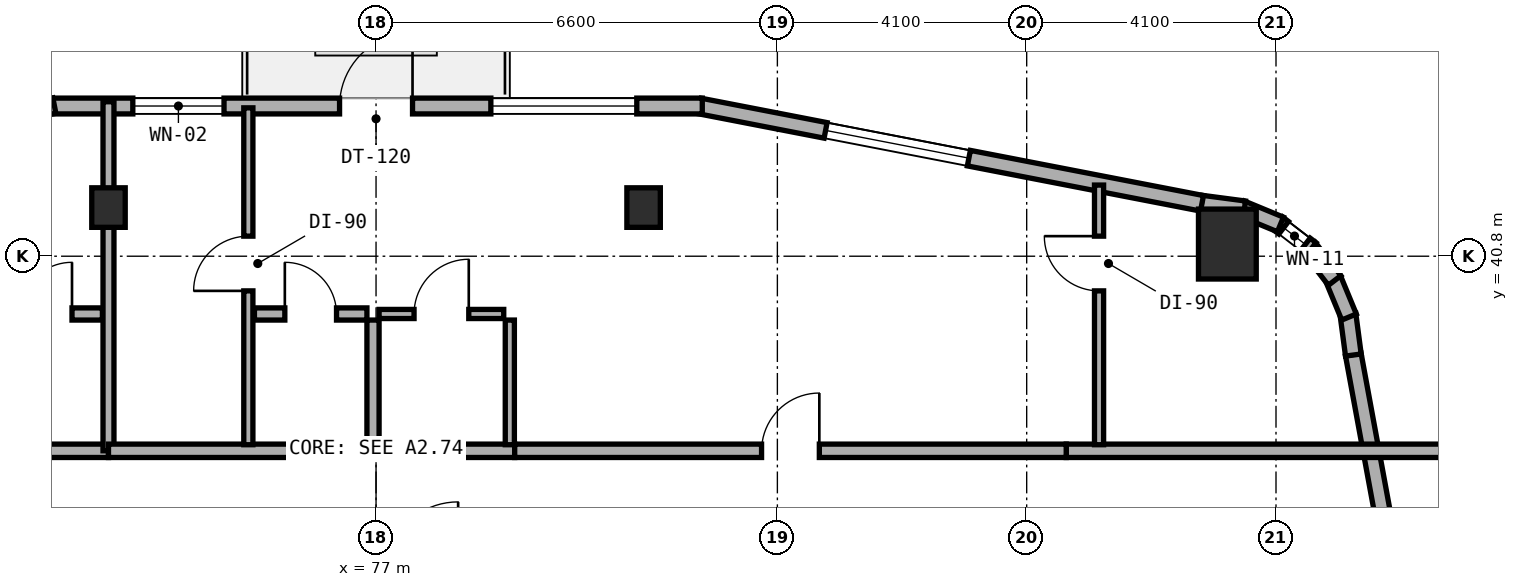
"""IFC4 building model, lengths in metres.
Left out: names, types, materials, properties, quantities, classifications, styles, units other than length and angle.
Written with IfcOpenShell. Run it as: python <this file> out.ifc"""

import sys

from ifc_helpers import new_model, si_unit, direction, frame, frame_2d, origin, origin_2d, place, context, subcontext, project, spatial, rectangle, extrude, element, fill, save


model = new_model("IFC4")
c1 = context("Model", 3, precision=1e-05, world=origin(), true_north=direction((0.0, 1.0)))
c2 = subcontext(c1, "Body", "Model", "MODEL_VIEW")
j1 = project(units=[si_unit("LENGTHUNIT", "METRE"), si_unit("PLANEANGLEUNIT", "RADIAN")], contexts=[c1])
p1 = place(None, origin())
s1 = spatial("IfcSite", under=j1, at=p1, CompositionType="ELEMENT")
p2 = place(p1, origin())
s2 = spatial("IfcBuilding", under=s1, at=p2, CompositionType="ELEMENT")
p3 = place(p2, frame((0.0, 0.0, 112.5)))
s3 = spatial("IfcBuildingStorey", under=s2, at=p3, CompositionType="ELEMENT", Elevation=112.5)
for number, where, z_axis, x_axis in (
    (1, (72.6, 41.6, 0.0), (0.0, 0.0, 1.0), (1.0, 0.0, 0.0)),
    (2, (81.4, 41.6, 0.0), (0.0, 0.0, 1.0), (1.0, 0.0, 0.0)),
):
    element("IfcColumn", number, at=place(p3, frame(where, z_axis=z_axis, x_axis=x_axis)), inside=s3, PredefinedType="COLUMN", context=c2, shape_type="SweptSolid", body=[
        extrude(rectangle(XDim=0.55, YDim=0.65, at=origin_2d()), origin(), (0.0, 0.0, 1.0), 3.5),
    ])
p4 = place(p3, frame((91.0, 41.0, 0.0), z_axis=(0.0, 0.0, 1.0), x_axis=(1.0, 0.0, 0.0)))
e3 = element("IfcColumn", 3, at=p4, inside=s3, PredefinedType="COLUMN", context=c2, shape_type="SweptSolid", body=[
    extrude(rectangle(XDim=0.95, YDim=1.15, at=origin_2d()), origin(), (0.0, 0.0, 1.0), 3.5),
])
p5 = place(p3, frame((94.682, 30.442, 0.0), z_axis=(0.0, 0.0, 1.0), x_axis=(-0.181209963057, 0.983444431215, 0.0)))
e4 = element("IfcWall", 4, at=p5, inside=s3, PredefinedType="STANDARD", context=c2, shape_type="SweptSolid", body=[
    extrude(rectangle(XDim=8.889, YDim=0.26, at=frame_2d((4.445, 0.0))), origin(), (0.0, 0.0, 1.0), 3.25),
])
p6 = place(p5, frame((1.444, 0.0, 0.8)))
e5 = element("IfcOpeningElement", 5, at=p6, cuts=e4, PredefinedType="OPENING", context=c2, shape_type="SweptSolid", body=[
    extrude(rectangle(XDim=2.4, YDim=1.6, at=frame_2d((1.2, 0.8))), frame((0.0, 0.14, 0.0), z_axis=(0.0, -1.0, 0.0), x_axis=(1.0, 0.0, 0.0)), (0.0, 0.0, 1.0), 0.28),
])
p7 = place(p3, frame((93.072, 39.175, 0.0), z_axis=(0.0, 0.0, 1.0), x_axis=(-0.131667498923, 0.991293937098, 0.0)))
e6 = element("IfcWall", 6, at=p7, inside=s3, PredefinedType="STANDARD", context=c2, shape_type="SweptSolid", body=[
    extrude(rectangle(XDim=0.677, YDim=0.26, at=frame_2d((0.338, 0.0))), origin(), (0.0, 0.0, 1.0), 3.25),
])
p8 = place(p3, frame((93.001, 39.8, 0.0), z_axis=(0.0, 0.0, 1.0), x_axis=(-0.381988976935, 0.924166879681, 0.0)))
e7 = element("IfcWall", 7, at=p8, inside=s3, PredefinedType="STANDARD", context=c2, shape_type="SweptSolid", body=[
    extrude(rectangle(XDim=0.693, YDim=0.26, at=frame_2d((0.347, 0.0))), origin(), (0.0, 0.0, 1.0), 3.25),
])
p9 = place(p3, frame((92.764, 40.401, 0.0), z_axis=(0.0, 0.0, 1.0), x_axis=(-0.609472651958, 0.792807092876, 0.0)))
e8 = element("IfcWall", 8, at=p9, inside=s3, PredefinedType="STANDARD", context=c2, shape_type="SweptSolid", body=[
    extrude(rectangle(XDim=0.694, YDim=0.26, at=frame_2d((0.347, 0.0))), origin(), (0.0, 0.0, 1.0), 3.25),
])
p10 = place(p3, frame((92.379, 40.92, 0.0), z_axis=(0.0, 0.0, 1.0), x_axis=(-0.792506234191, 0.609863811657, 0.0)))
e9 = element("IfcWall", 9, at=p10, inside=s3, PredefinedType="STANDARD", context=c2, shape_type="SweptSolid", body=[
    extrude(rectangle(XDim=0.694, YDim=0.26, at=frame_2d((0.347, 0.0))), origin(), (0.0, 0.0, 1.0), 3.25),
])
p11 = place(p10, frame((0.122, 0.0, 0.85)))
e10 = element("IfcOpeningElement", 10, at=p11, cuts=e9, PredefinedType="OPENING", context=c2, shape_type="SweptSolid", body=[
    extrude(rectangle(XDim=0.45, YDim=1.5, at=frame_2d((0.225, 0.75))), frame((0.0, 0.14, 0.0), z_axis=(0.0, -1.0, 0.0), x_axis=(1.0, 0.0, 0.0)), (0.0, 0.0, 1.0), 0.28),
])
p12 = place(p3, frame((91.873, 41.322, 0.0), z_axis=(0.0, 0.0, 1.0), x_axis=(-0.92421822618, 0.381864727877, 0.0)))
e11 = element("IfcWall", 11, at=p12, inside=s3, PredefinedType="STANDARD", context=c2, shape_type="SweptSolid", body=[
    extrude(rectangle(XDim=0.694, YDim=0.26, at=frame_2d((0.347, 0.0))), origin(), (0.0, 0.0, 1.0), 3.25),
])
p13 = place(p3, frame((91.281, 41.579, 0.0), z_axis=(0.0, 0.0, 1.0), x_axis=(-0.991433279471, 0.130614135366, 0.0)))
e12 = element("IfcWall", 12, at=p13, inside=s3, PredefinedType="STANDARD", context=c2, shape_type="SweptSolid", body=[
    extrude(rectangle(XDim=0.712, YDim=0.26, at=frame_2d((0.356, 0.0))), origin(), (0.0, 0.0, 1.0), 3.25),
])
p14 = place(p3, frame((90.583, 41.67, 0.0), z_axis=(0.0, 0.0, 1.0), x_axis=(-0.98174070399, 0.190224052445, 0.0)))
e13 = element("IfcWall", 13, at=p14, inside=s3, PredefinedType="STANDARD", context=c2, shape_type="SweptSolid", body=[
    extrude(rectangle(XDim=8.412, YDim=0.26, at=frame_2d((4.206, 0.0))), origin(), (0.0, 0.0, 1.0), 3.25),
])
p15 = place(p14, frame((3.905, 0.0, 0.8)))
e14 = element("IfcOpeningElement", 14, at=p15, cuts=e13, PredefinedType="OPENING", context=c2, shape_type="SweptSolid", body=[
    extrude(rectangle(XDim=2.4, YDim=1.6, at=frame_2d((1.2, 0.8))), frame((0.0, 0.14, 0.0), z_axis=(0.0, -1.0, 0.0), x_axis=(1.0, 0.0, 0.0)), (0.0, 0.0, 1.0), 0.28),
])
p16 = place(p3, frame((82.365, 43.27, 0.0), z_axis=(0.0, 0.0, 1.0), x_axis=(-1.0, 0.0, 0.0)))
e15 = element("IfcWall", 15, at=p16, inside=s3, PredefinedType="STANDARD", context=c2, shape_type="SweptSolid", body=[
    extrude(rectangle(XDim=10.695, YDim=0.26, at=frame_2d((5.348, 0.0))), origin(), (0.0, 0.0, 1.0), 3.25),
])
p17 = place(p16, frame((4.765, 0.0, 0.0)))
e16 = element("IfcOpeningElement", 16, at=p17, cuts=e15, PredefinedType="OPENING", context=c2, shape_type="SweptSolid", body=[
    extrude(rectangle(XDim=1.2, YDim=2.15, at=frame_2d((0.6, 1.075))), frame((0.0, 0.14, 0.0), z_axis=(0.0, -1.0, 0.0), x_axis=(1.0, 0.0, 0.0)), (0.0, 0.0, 1.0), 0.28),
])
p18 = place(p16, frame((1.077, 0.0, 0.8)))
e17 = element("IfcOpeningElement", 17, at=p18, cuts=e15, PredefinedType="OPENING", context=c2, shape_type="SweptSolid", body=[
    extrude(rectangle(XDim=2.4, YDim=1.6, at=frame_2d((1.2, 0.8))), frame((0.0, 0.14, 0.0), z_axis=(0.0, -1.0, 0.0), x_axis=(1.0, 0.0, 0.0)), (0.0, 0.0, 1.0), 0.28),
])
p19 = place(p16, frame((7.865, 0.0, 0.85)))
e18 = element("IfcOpeningElement", 18, at=p19, cuts=e15, PredefinedType="OPENING", context=c2, shape_type="SweptSolid", body=[
    extrude(rectangle(XDim=1.5, YDim=1.5, at=frame_2d((0.75, 0.75))), frame((0.0, 0.14, 0.0), z_axis=(0.0, -1.0, 0.0), x_axis=(1.0, 0.0, 0.0)), (0.0, 0.0, 1.0), 0.28),
])
p20 = place(p3, frame((71.71, 43.277, 0.0), z_axis=(0.0, 0.0, 1.0), x_axis=(-0.981733729692, -0.190260043057, 0.0)))
e19 = element("IfcWall", 19, at=p20, inside=s3, PredefinedType="STANDARD", context=c2, shape_type="SweptSolid", body=[
    extrude(rectangle(XDim=8.447, YDim=0.26, at=frame_2d((4.224, 0.0))), origin(), (0.0, 0.0, 1.0), 3.25),
])
p21 = place(p20, frame((2.608, 0.0, 0.8)))
e20 = element("IfcOpeningElement", 20, at=p21, cuts=e19, PredefinedType="OPENING", context=c2, shape_type="SweptSolid", body=[
    extrude(rectangle(XDim=2.4, YDim=1.6, at=frame_2d((1.2, 0.8))), frame((0.0, 0.14, 0.0), z_axis=(0.0, -1.0, 0.0), x_axis=(1.0, 0.0, 0.0)), (0.0, 0.0, 1.0), 0.28),
])
p22 = place(p3, frame((68.22, 37.6, 0.0), z_axis=(0.0, 0.0, 1.0), x_axis=(1.0, 0.0, 0.0)))
e21 = element("IfcWall", 21, at=p22, inside=s3, PredefinedType="SOLIDWALL", context=c2, shape_type="SweptSolid", body=[
    extrude(rectangle(XDim=4.38, YDim=0.22, at=frame_2d((2.19, 0.0))), origin(), (0.0, 0.0, 1.0), 2.825),
])
p23 = place(p3, frame((70.65, 39.85, 0.0), z_axis=(0.0, 0.0, 1.0), x_axis=(1.0, 0.0, 0.0)))
e22 = element("IfcWall", 22, at=p23, inside=s3, PredefinedType="PLUMBINGWALL", context=c2, shape_type="SweptSolid", body=[
    extrude(rectangle(XDim=1.85, YDim=0.2, at=frame_2d((0.925, 0.0))), origin(), (0.0, 0.0, 1.0), 3.22),
])
p24 = place(p23, frame((0.5, 0.0, 0.0)))
e23 = element("IfcOpeningElement", 23, at=p24, cuts=e22, PredefinedType="OPENING", context=c2, shape_type="SweptSolid", body=[
    extrude(rectangle(XDim=0.85, YDim=2.1, at=frame_2d((0.425, 1.05))), frame((0.0, 0.11, 0.0), z_axis=(0.0, -1.0, 0.0), x_axis=(1.0, 0.0, 0.0)), (0.0, 0.0, 1.0), 0.22),
])
p25 = place(p3, frame((72.6, 37.6, 0.0), z_axis=(0.0, 0.0, 1.0), x_axis=(0.0, 1.0, 0.0)))
e24 = element("IfcWall", 24, at=p25, inside=s3, PredefinedType="SOLIDWALL", context=c2, shape_type="SweptSolid", body=[
    extrude(rectangle(XDim=5.74, YDim=0.18, at=frame_2d((2.87, 0.0))), origin(), (0.0, 0.0, 1.0), 2.825),
])
p26 = place(p3, frame((72.6, 37.6, 0.0), z_axis=(0.0, 0.0, 1.0), x_axis=(1.0, 0.0, 0.0)))
e25 = element("IfcWall", 25, at=p26, inside=s3, PredefinedType="SOLIDWALL", context=c2, shape_type="SweptSolid", body=[
    extrude(rectangle(XDim=6.68, YDim=0.22, at=frame_2d((3.34, 0.0))), origin(), (0.0, 0.0, 1.0), 2.825),
])
p27 = place(p3, frame((88.35, 37.6, 0.0), z_axis=(0.0, 0.0, 1.0), x_axis=(1.0, 0.0, 0.0)))
e26 = element("IfcWall", 26, at=p27, inside=s3, PredefinedType="SOLIDWALL", context=c2, shape_type="SweptSolid", body=[
    extrude(rectangle(XDim=6.29, YDim=0.22, at=frame_2d((3.145, 0.0))), origin(), (0.0, 0.0, 1.0), 2.945),
])
p28 = place(p3, frame((79.28, 37.6, 0.0), z_axis=(0.0, 0.0, 1.0), x_axis=(1.0, 0.0, 0.0)))
e27 = element("IfcWall", 27, at=p28, inside=s3, PredefinedType="SOLIDWALL", context=c2, shape_type="SweptSolid", body=[
    extrude(rectangle(XDim=9.07, YDim=0.22, at=frame_2d((4.535, 0.0))), origin(), (0.0, 0.0, 1.0), 2.825),
])
p29 = place(p28, frame((4.06, 0.0, 0.0)))
e28 = element("IfcOpeningElement", 28, at=p29, cuts=e27, PredefinedType="OPENING", context=c2, shape_type="SweptSolid", body=[
    extrude(rectangle(XDim=0.95, YDim=2.1, at=frame_2d((0.475, 1.05))), frame((0.0, 0.12, 0.0), z_axis=(0.0, -1.0, 0.0), x_axis=(1.0, 0.0, 0.0)), (0.0, 0.0, 1.0), 0.24),
])
p30 = place(p3, frame((74.9, 37.7, 0.0), z_axis=(0.0, 0.0, 1.0), x_axis=(0.0, 1.0, 0.0)))
e29 = element("IfcWall", 29, at=p30, inside=s3, PredefinedType="PARTITIONING", context=c2, shape_type="SweptSolid", body=[
    extrude(rectangle(XDim=5.54, YDim=0.15, at=frame_2d((2.77, 0.0))), origin(), (0.0, 0.0, 1.0), 2.895),
])
p31 = place(p30, frame((2.53, 0.0, 0.0)))
e30 = element("IfcOpeningElement", 30, at=p31, cuts=e29, PredefinedType="OPENING", context=c2, shape_type="SweptSolid", body=[
    extrude(rectangle(XDim=0.9, YDim=2.1, at=frame_2d((0.45, 1.05))), frame((0.0, 0.085, 0.0), z_axis=(0.0, -1.0, 0.0), x_axis=(1.0, 0.0, 0.0)), (0.0, 0.0, 1.0), 0.17),
])
p32 = place(p3, frame((88.89, 37.7, 0.0), z_axis=(0.0, 0.0, 1.0), x_axis=(0.0, 1.0, 0.0)))
e31 = element("IfcWall", 31, at=p32, inside=s3, PredefinedType="PARTITIONING", context=c2, shape_type="SweptSolid", body=[
    extrude(rectangle(XDim=4.27, YDim=0.15, at=frame_2d((2.135, 0.0))), origin(), (0.0, 0.0, 1.0), 2.945),
])
p33 = place(p32, frame((2.53, 0.0, 0.0)))
e32 = element("IfcOpeningElement", 32, at=p33, cuts=e31, PredefinedType="OPENING", context=c2, shape_type="SweptSolid", body=[
    extrude(rectangle(XDim=0.9, YDim=2.1, at=frame_2d((0.45, 1.05))), frame((0.0, 0.085, 0.0), z_axis=(0.0, -1.0, 0.0), x_axis=(1.0, 0.0, 0.0)), (0.0, 0.0, 1.0), 0.17),
])
p34 = place(p3, frame((76.95, 37.7, 0.0), z_axis=(0.0, 0.0, 1.0), x_axis=(0.0, 1.0, 0.0)))
e33 = element("IfcWall", 33, at=p34, inside=s3, PredefinedType="PLUMBINGWALL", context=c2, shape_type="SweptSolid", body=[
    extrude(rectangle(XDim=2.05, YDim=0.2, at=frame_2d((1.025, 0.0))), origin(), (0.0, 0.0, 1.0), 2.895),
])
p35 = place(p3, frame((79.2, 37.7, 0.0), z_axis=(0.0, 0.0, 1.0), x_axis=(0.0, 1.0, 0.0)))
e34 = element("IfcWall", 34, at=p35, inside=s3, PredefinedType="PARTITIONING", context=c2, shape_type="SweptSolid", body=[
    extrude(rectangle(XDim=2.05, YDim=0.15, at=frame_2d((1.025, 0.0))), origin(), (0.0, 0.0, 1.0), 2.895),
])
p36 = place(p3, frame((75.0, 39.85, 0.0), z_axis=(0.0, 0.0, 1.0), x_axis=(1.0, 0.0, 0.0)))
e35 = element("IfcWall", 35, at=p36, inside=s3, PredefinedType="PLUMBINGWALL", context=c2, shape_type="SweptSolid", body=[
    extrude(rectangle(XDim=1.85, YDim=0.2, at=frame_2d((0.925, 0.0))), origin(), (0.0, 0.0, 1.0), 3.22),
])
p37 = place(p36, frame((0.5, 0.0, 0.0)))
e36 = element("IfcOpeningElement", 36, at=p37, cuts=e35, PredefinedType="OPENING", context=c2, shape_type="SweptSolid", body=[
    extrude(rectangle(XDim=0.85, YDim=2.1, at=frame_2d((0.425, 1.05))), frame((0.0, 0.11, 0.0), z_axis=(0.0, -1.0, 0.0), x_axis=(1.0, 0.0, 0.0)), (0.0, 0.0, 1.0), 0.22),
])
p38 = place(p3, frame((77.05, 39.85, 0.0), z_axis=(0.0, 0.0, 1.0), x_axis=(1.0, 0.0, 0.0)))
e37 = element("IfcWall", 37, at=p38, inside=s3, PredefinedType="PARTITIONING", context=c2, shape_type="SweptSolid", body=[
    extrude(rectangle(XDim=2.05, YDim=0.15, at=frame_2d((1.025, 0.0))), origin(), (0.0, 0.0, 1.0), 3.22),
])
p39 = place(p38, frame((0.575, 0.0, 0.0)))
e38 = element("IfcOpeningElement", 38, at=p39, cuts=e37, PredefinedType="OPENING", context=c2, shape_type="SweptSolid", body=[
    extrude(rectangle(XDim=0.9, YDim=2.1, at=frame_2d((0.45, 1.05))), frame((0.0, 0.085, 0.0), z_axis=(0.0, -1.0, 0.0), x_axis=(1.0, 0.0, 0.0)), (0.0, 0.0, 1.0), 0.17),
])
p40 = place(p15, origin())
e39 = element("IfcWindow", 39, at=p40, inside=s3, PartitioningType="SINGLE_PANEL", PredefinedType="WINDOW", context=c2, shape_type="SweptSolid", body=[
    extrude(rectangle(XDim=2.4, YDim=1.6, at=frame_2d((1.2, 0.8))), frame((0.0, 0.03, 0.0), z_axis=(0.0, -1.0, 0.0), x_axis=(1.0, 0.0, 0.0)), (0.0, 0.0, 1.0), 0.06),
])
fill(e14, e39)
p41 = place(p17, frame((1.2, 0.0, 0.0), z_axis=(0.0, 0.0, 1.0), x_axis=(-1.0, 0.0, 0.0)))
e40 = element("IfcDoor", 40, at=p41, inside=s3, OperationType="SINGLE_SWING_RIGHT", PredefinedType="DOOR", context=c2, shape_type="SweptSolid", body=[
    extrude(rectangle(XDim=1.2, YDim=2.15, at=frame_2d((0.6, 1.075))), frame((0.0, 0.025, 0.0), z_axis=(0.0, -1.0, 0.0), x_axis=(1.0, 0.0, 0.0)), (0.0, 0.0, 1.0), 0.05),
])
fill(e16, e40)
p42 = place(p18, origin())
e41 = element("IfcWindow", 41, at=p42, inside=s3, PartitioningType="SINGLE_PANEL", PredefinedType="WINDOW", context=c2, shape_type="SweptSolid", body=[
    extrude(rectangle(XDim=2.4, YDim=1.6, at=frame_2d((1.2, 0.8))), frame((0.0, 0.03, 0.0), z_axis=(0.0, -1.0, 0.0), x_axis=(1.0, 0.0, 0.0)), (0.0, 0.0, 1.0), 0.06),
])
fill(e17, e41)
p43 = place(p19, origin())
e42 = element("IfcWindow", 42, at=p43, inside=s3, PartitioningType="SINGLE_PANEL", PredefinedType="WINDOW", context=c2, shape_type="SweptSolid", body=[
    extrude(rectangle(XDim=1.5, YDim=1.5, at=frame_2d((0.75, 0.75))), frame((0.0, 0.03, 0.0), z_axis=(0.0, -1.0, 0.0), x_axis=(1.0, 0.0, 0.0)), (0.0, 0.0, 1.0), 0.06),
])
fill(e18, e42)
p44 = place(p11, origin())
e43 = element("IfcWindow", 43, at=p44, inside=s3, PartitioningType="SINGLE_PANEL", PredefinedType="WINDOW", context=c2, shape_type="SweptSolid", body=[
    extrude(rectangle(XDim=0.45, YDim=1.5, at=frame_2d((0.225, 0.75))), frame((0.0, 0.03, 0.0), z_axis=(0.0, -1.0, 0.0), x_axis=(1.0, 0.0, 0.0)), (0.0, 0.0, 1.0), 0.06),
])
fill(e10, e43)
p45 = place(p24, origin())
e44 = element("IfcDoor", 44, at=p45, inside=s3, OperationType="SINGLE_SWING_RIGHT", PredefinedType="DOOR", context=c2, shape_type="SweptSolid", body=[
    extrude(rectangle(XDim=0.85, YDim=2.1, at=frame_2d((0.425, 1.05))), frame((0.0, 0.025, 0.0), z_axis=(0.0, -1.0, 0.0), x_axis=(1.0, 0.0, 0.0)), (0.0, 0.0, 1.0), 0.05),
])
fill(e23, e44)
p46 = place(p29, origin())
e45 = element("IfcDoor", 45, at=p46, inside=s3, OperationType="SINGLE_SWING_RIGHT", PredefinedType="DOOR", context=c2, shape_type="SweptSolid", body=[
    extrude(rectangle(XDim=0.95, YDim=2.1, at=frame_2d((0.475, 1.05))), frame((0.0, 0.025, 0.0), z_axis=(0.0, -1.0, 0.0), x_axis=(1.0, 0.0, 0.0)), (0.0, 0.0, 1.0), 0.05),
])
fill(e28, e45)
p47 = place(p31, origin())
e46 = element("IfcDoor", 46, at=p47, inside=s3, OperationType="SINGLE_SWING_LEFT", PredefinedType="DOOR", context=c2, shape_type="SweptSolid", body=[
    extrude(rectangle(XDim=0.9, YDim=2.1, at=frame_2d((0.45, 1.05))), frame((0.0, 0.025, 0.0), z_axis=(0.0, -1.0, 0.0), x_axis=(1.0, 0.0, 0.0)), (0.0, 0.0, 1.0), 0.05),
])
fill(e30, e46)
p48 = place(p33, origin())
e47 = element("IfcDoor", 47, at=p48, inside=s3, OperationType="SINGLE_SWING_RIGHT", PredefinedType="DOOR", context=c2, shape_type="SweptSolid", body=[
    extrude(rectangle(XDim=0.9, YDim=2.1, at=frame_2d((0.45, 1.05))), frame((0.0, 0.025, 0.0), z_axis=(0.0, -1.0, 0.0), x_axis=(1.0, 0.0, 0.0)), (0.0, 0.0, 1.0), 0.05),
])
fill(e32, e47)
p49 = place(p37, origin())
e48 = element("IfcDoor", 48, at=p49, inside=s3, OperationType="SINGLE_SWING_LEFT", PredefinedType="DOOR", context=c2, shape_type="SweptSolid", body=[
    extrude(rectangle(XDim=0.85, YDim=2.1, at=frame_2d((0.425, 1.05))), frame((0.0, 0.025, 0.0), z_axis=(0.0, -1.0, 0.0), x_axis=(1.0, 0.0, 0.0)), (0.0, 0.0, 1.0), 0.05),
])
fill(e36, e48)
p50 = place(p39, origin())
e49 = element("IfcDoor", 49, at=p50, inside=s3, OperationType="SINGLE_SWING_RIGHT", PredefinedType="DOOR", context=c2, shape_type="SweptSolid", body=[
    extrude(rectangle(XDim=0.9, YDim=2.1, at=frame_2d((0.45, 1.05))), frame((0.0, 0.025, 0.0), z_axis=(0.0, -1.0, 0.0), x_axis=(1.0, 0.0, 0.0)), (0.0, 0.0, 1.0), 0.05),
])
fill(e38, e49)
save(model, sys.argv[1])
